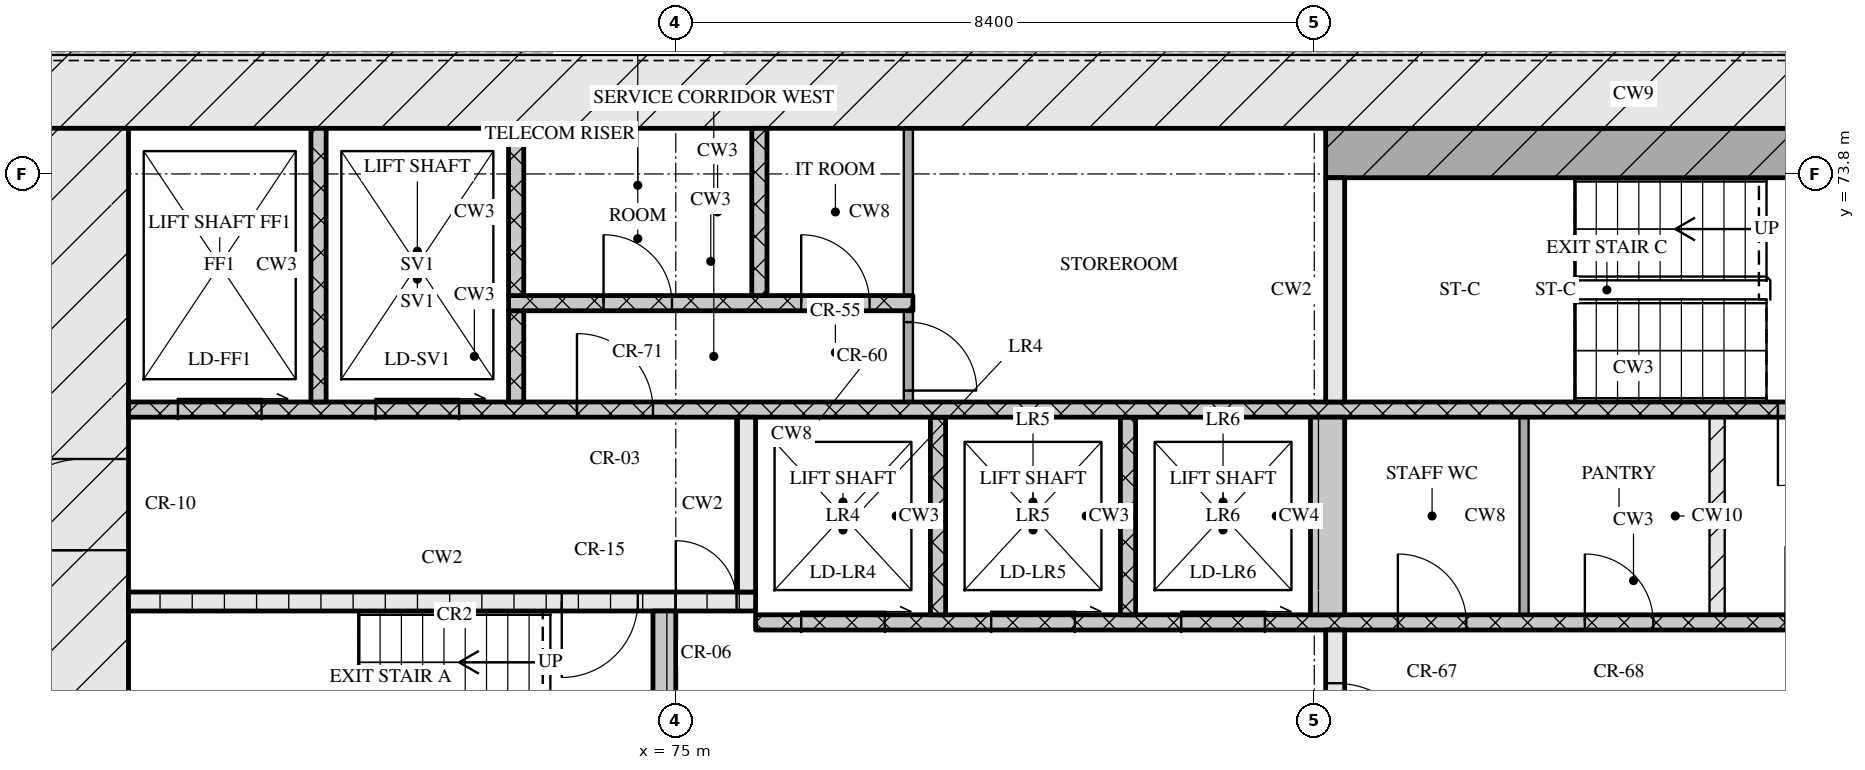
"""IFC4 building model, lengths in metres.
Left out: names, types, materials, properties, quantities, classifications, styles, units other than length and angle.
Written with IfcOpenShell. Run it as: python <this file> out.ifc"""

import sys

from ifc_helpers import new_model, si_unit, direction, frame, frame_2d, origin, place, context, subcontext, project, spatial, rectangle, extrude, element, fill, save


model = new_model("IFC4")
c1 = context("Model", 3, precision=1e-05, world=origin(), true_north=direction((0.0, 1.0)))
c2 = subcontext(c1, "Body", "Model", "MODEL_VIEW")
j1 = project(units=[si_unit("LENGTHUNIT", "METRE"), si_unit("PLANEANGLEUNIT", "RADIAN")], contexts=[c1])
p1 = place(None, origin())
s1 = spatial("IfcSite", under=j1, at=p1, CompositionType="ELEMENT")
p2 = place(p1, origin())
s2 = spatial("IfcBuilding", under=s1, at=p2, CompositionType="ELEMENT")
p3 = place(p2, frame((0.0, 0.0, 69.6)))
s3 = spatial("IfcBuildingStorey", under=s2, at=p3, CompositionType="ELEMENT", Elevation=69.6)
p4 = place(p3, frame((66.6, 75.0, 0.0), z_axis=(0.0, 0.0, 1.0), x_axis=(1.0, 0.0, 0.0)))
e1 = element("IfcWall", 1, at=p4, inside=s3, PredefinedType="SOLIDWALL", context=c2, shape_type="SweptSolid", body=[
    extrude(rectangle(XDim=42.0, YDim=1.2, at=frame_2d((21.0, 0.0))), origin(), (0.0, 0.0, 1.0), 3.32),
])
p5 = place(p3, frame((67.2, 62.4, 0.0), z_axis=(0.0, 0.0, 1.0), x_axis=(0.0, 1.0, 0.0)))
e2 = element("IfcWall", 2, at=p5, inside=s3, PredefinedType="SOLIDWALL", context=c2, shape_type="SweptSolid", body=[
    extrude(rectangle(XDim=12.0, YDim=1.2, at=frame_2d((6.0, 0.0))), origin(), (0.0, 0.0, 1.0), 3.32),
])
p6 = place(p5, frame((6.45, 0.0, 0.0)))
e3 = element("IfcOpeningElement", 3, at=p6, cuts=e2, PredefinedType="OPENING", context=c2, shape_type="SweptSolid", body=[
    extrude(rectangle(XDim=1.2, YDim=2.1, at=frame_2d((0.6, 1.05))), frame((0.0, 0.61, 0.0), z_axis=(0.0, -1.0, 0.0), x_axis=(1.0, 0.0, 0.0)), (0.0, 0.0, 1.0), 1.22),
])
p7 = place(p3, frame((74.85, 65.2, 0.0), z_axis=(0.0, 0.0, 1.0), x_axis=(0.0, 1.0, 0.0)))
e4 = element("IfcWall", 4, at=p7, inside=s3, PredefinedType="SOLIDWALL", context=c2, shape_type="SweptSolid", body=[
    extrude(rectangle(XDim=2.85, YDim=0.3, at=frame_2d((1.425, 0.0))), origin(), (0.0, 0.0, 1.0), 3.32),
])
p8 = place(p3, frame((83.675, 65.2, 0.0), z_axis=(0.0, 0.0, 1.0), x_axis=(0.0, 1.0, 0.0)))
e5 = element("IfcWall", 5, at=p8, inside=s3, PredefinedType="SOLIDWALL", context=c2, shape_type="SweptSolid", body=[
    extrude(rectangle(XDim=2.6, YDim=0.25, at=frame_2d((1.3, 0.0))), origin(), (0.0, 0.0, 1.0), 3.32),
])
p9 = place(p8, frame((0.7, 0.0, 0.0)))
e6 = element("IfcOpeningElement", 6, at=p9, cuts=e5, PredefinedType="OPENING", context=c2, shape_type="SweptSolid", body=[
    extrude(rectangle(XDim=1.2, YDim=2.1, at=frame_2d((0.6, 1.05))), frame((0.0, 0.135, 0.0), z_axis=(0.0, -1.0, 0.0), x_axis=(1.0, 0.0, 0.0)), (0.0, 0.0, 1.0), 0.27),
])
p10 = place(p3, frame((76.05, 67.9, 0.0), z_axis=(0.0, 0.0, 1.0), x_axis=(1.0, 0.0, 0.0)))
e7 = element("IfcWall", 7, at=p10, inside=s3, PredefinedType="SOLIDWALL", context=c2, shape_type="SweptSolid", body=[
    extrude(rectangle(XDim=23.1, YDim=0.2, at=frame_2d((11.55, 0.0))), origin(), (0.0, 0.0, 1.0), 3.32),
])
p11 = place(p10, frame((0.6, 0.0, 0.0)))
e8 = element("IfcOpeningElement", 8, at=p11, cuts=e7, PredefinedType="OPENING", context=c2, shape_type="SweptSolid", body=[
    extrude(rectangle(XDim=1.1, YDim=2.1, at=frame_2d((0.55, 1.05))), frame((0.0, 0.11, 0.0), z_axis=(0.0, -1.0, 0.0), x_axis=(1.0, 0.0, 0.0)), (0.0, 0.0, 1.0), 0.22),
])
p12 = place(p10, frame((3.1, 0.0, 0.0)))
e9 = element("IfcOpeningElement", 9, at=p12, cuts=e7, PredefinedType="OPENING", context=c2, shape_type="SweptSolid", body=[
    extrude(rectangle(XDim=1.1, YDim=2.1, at=frame_2d((0.55, 1.05))), frame((0.0, 0.11, 0.0), z_axis=(0.0, -1.0, 0.0), x_axis=(1.0, 0.0, 0.0)), (0.0, 0.0, 1.0), 0.22),
])
p13 = place(p10, frame((5.6, 0.0, 0.0)))
e10 = element("IfcOpeningElement", 10, at=p13, cuts=e7, PredefinedType="OPENING", context=c2, shape_type="SweptSolid", body=[
    extrude(rectangle(XDim=1.1, YDim=2.1, at=frame_2d((0.55, 1.05))), frame((0.0, 0.11, 0.0), z_axis=(0.0, -1.0, 0.0), x_axis=(1.0, 0.0, 0.0)), (0.0, 0.0, 1.0), 0.22),
])
p14 = place(p10, frame((8.45, 0.0, 0.0)))
e11 = element("IfcOpeningElement", 11, at=p14, cuts=e7, PredefinedType="OPENING", context=c2, shape_type="SweptSolid", body=[
    extrude(rectangle(XDim=0.9, YDim=2.1, at=frame_2d((0.45, 1.05))), frame((0.0, 0.11, 0.0), z_axis=(0.0, -1.0, 0.0), x_axis=(1.0, 0.0, 0.0)), (0.0, 0.0, 1.0), 0.22),
])
p15 = place(p10, frame((10.91, 0.0, 0.0)))
e12 = element("IfcOpeningElement", 12, at=p15, cuts=e7, PredefinedType="OPENING", context=c2, shape_type="SweptSolid", body=[
    extrude(rectangle(XDim=0.9, YDim=2.1, at=frame_2d((0.45, 1.05))), frame((0.0, 0.11, 0.0), z_axis=(0.0, -1.0, 0.0), x_axis=(1.0, 0.0, 0.0)), (0.0, 0.0, 1.0), 0.22),
])
p16 = place(p10, frame((13.55, 0.0, 0.0)))
e13 = element("IfcOpeningElement", 13, at=p16, cuts=e7, PredefinedType="OPENING", context=c2, shape_type="SweptSolid", body=[
    extrude(rectangle(XDim=1.0, YDim=2.1, at=frame_2d((0.5, 1.05))), frame((0.0, 0.11, 0.0), z_axis=(0.0, -1.0, 0.0), x_axis=(1.0, 0.0, 0.0)), (0.0, 0.0, 1.0), 0.22),
])
for number, where, z_axis, x_axis in (
    (14, (78.45, 68.0, 0.0), (0.0, 0.0, 1.0), (0.0, 1.0, 0.0)),
    (15, (80.95, 68.0, 0.0), (0.0, 0.0, 1.0), (0.0, 1.0, 0.0)),
):
    element("IfcWall", number, at=place(p3, frame(where, z_axis=z_axis, x_axis=x_axis)), inside=s3, PredefinedType="SOLIDWALL", context=c2, shape_type="SweptSolid", body=[
        extrude(rectangle(XDim=2.6, YDim=0.2, at=frame_2d((1.3, 0.0))), origin(), (0.0, 0.0, 1.0), 3.32),
    ])
p17 = place(p3, frame((83.575, 68.0, 0.0), z_axis=(0.0, 0.0, 1.0), x_axis=(0.0, 1.0, 0.0)))
e16 = element("IfcWall", 16, at=p17, inside=s3, PredefinedType="SOLIDWALL", context=c2, shape_type="SweptSolid", body=[
    extrude(rectangle(XDim=2.6, YDim=0.45, at=frame_2d((1.3, 0.0))), origin(), (0.0, 0.0, 1.0), 3.32),
])
p18 = place(p3, frame((86.16, 68.0, 0.0), z_axis=(0.0, 0.0, 1.0), x_axis=(0.0, 1.0, 0.0)))
e17 = element("IfcWall", 17, at=p18, inside=s3, PredefinedType="PARTITIONING", context=c2, shape_type="SweptSolid", body=[
    extrude(rectangle(XDim=2.6, YDim=0.12, at=frame_2d((1.3, 0.0))), origin(), (0.0, 0.0, 1.0), 3.32),
])
p19 = place(p3, frame((88.7, 68.0, 0.0), z_axis=(0.0, 0.0, 1.0), x_axis=(0.0, 1.0, 0.0)))
e18 = element("IfcWall", 18, at=p19, inside=s3, PredefinedType="PARTITIONING", context=c2, shape_type="SweptSolid", body=[
    extrude(rectangle(XDim=2.6, YDim=0.2, at=frame_2d((1.3, 0.0))), origin(), (0.0, 0.0, 1.0), 3.32),
])
p20 = place(p3, frame((67.8, 68.175, 0.0), z_axis=(0.0, 0.0, 1.0), x_axis=(1.0, 0.0, 0.0)))
e19 = element("IfcWall", 19, at=p20, inside=s3, PredefinedType="SOLIDWALL", context=c2, shape_type="SweptSolid", body=[
    extrude(rectangle(XDim=8.25, YDim=0.25, at=frame_2d((4.125, 0.0))), origin(), (0.0, 0.0, 1.0), 3.32),
])
p21 = place(p20, frame((5.7, 0.0, 0.0)))
e20 = element("IfcOpeningElement", 20, at=p21, cuts=e19, PredefinedType="OPENING", context=c2, shape_type="SweptSolid", body=[
    extrude(rectangle(XDim=1.0, YDim=2.1, at=frame_2d((0.5, 1.05))), frame((0.0, 0.135, 0.0), z_axis=(0.0, -1.0, 0.0), x_axis=(1.0, 0.0, 0.0)), (0.0, 0.0, 1.0), 0.27),
])
p22 = place(p20, frame((7.2, 0.0, 0.0)))
e21 = element("IfcOpeningElement", 21, at=p22, cuts=e19, PredefinedType="OPENING", context=c2, shape_type="SweptSolid", body=[
    extrude(rectangle(XDim=0.8, YDim=2.1, at=frame_2d((0.4, 1.05))), frame((0.0, 0.135, 0.0), z_axis=(0.0, -1.0, 0.0), x_axis=(1.0, 0.0, 0.0)), (0.0, 0.0, 1.0), 0.27),
])
p23 = place(p3, frame((75.925, 68.3, 0.0), z_axis=(0.0, 0.0, 1.0), x_axis=(0.0, 1.0, 0.0)))
e22 = element("IfcWall", 22, at=p23, inside=s3, PredefinedType="SOLIDWALL", context=c2, shape_type="SweptSolid", body=[
    extrude(rectangle(XDim=2.3, YDim=0.25, at=frame_2d((1.15, 0.0))), origin(), (0.0, 0.0, 1.0), 3.32),
])
p24 = place(p3, frame((67.8, 70.7, 0.0), z_axis=(0.0, 0.0, 1.0), x_axis=(1.0, 0.0, 0.0)))
e23 = element("IfcWall", 23, at=p24, inside=s3, PredefinedType="SOLIDWALL", context=c2, shape_type="SweptSolid", body=[
    extrude(rectangle(XDim=39.6, YDim=0.2, at=frame_2d((19.8, 0.0))), origin(), (0.0, 0.0, 1.0), 3.32),
])
p25 = place(p24, frame((0.65, 0.0, 0.0)))
e24 = element("IfcOpeningElement", 24, at=p25, cuts=e23, PredefinedType="OPENING", context=c2, shape_type="SweptSolid", body=[
    extrude(rectangle(XDim=1.1, YDim=2.1, at=frame_2d((0.55, 1.05))), frame((0.0, 0.11, 0.0), z_axis=(0.0, -1.0, 0.0), x_axis=(1.0, 0.0, 0.0)), (0.0, 0.0, 1.0), 0.22),
])
p26 = place(p24, frame((3.25, 0.0, 0.0)))
e25 = element("IfcOpeningElement", 25, at=p26, cuts=e23, PredefinedType="OPENING", context=c2, shape_type="SweptSolid", body=[
    extrude(rectangle(XDim=1.1, YDim=2.1, at=frame_2d((0.55, 1.05))), frame((0.0, 0.11, 0.0), z_axis=(0.0, -1.0, 0.0), x_axis=(1.0, 0.0, 0.0)), (0.0, 0.0, 1.0), 0.22),
])
p27 = place(p24, frame((5.9, 0.0, 0.0)))
e26 = element("IfcOpeningElement", 26, at=p27, cuts=e23, PredefinedType="OPENING", context=c2, shape_type="SweptSolid", body=[
    extrude(rectangle(XDim=1.0, YDim=2.1, at=frame_2d((0.5, 1.05))), frame((0.0, 0.11, 0.0), z_axis=(0.0, -1.0, 0.0), x_axis=(1.0, 0.0, 0.0)), (0.0, 0.0, 1.0), 0.22),
])
p28 = place(p24, frame((21.7, 0.0, 0.0)))
e27 = element("IfcOpeningElement", 27, at=p28, cuts=e23, PredefinedType="OPENING", context=c2, shape_type="SweptSolid", body=[
    extrude(rectangle(XDim=1.0, YDim=2.1, at=frame_2d((0.5, 1.05))), frame((0.0, 0.11, 0.0), z_axis=(0.0, -1.0, 0.0), x_axis=(1.0, 0.0, 0.0)), (0.0, 0.0, 1.0), 0.22),
])
p29 = place(p24, frame((32.7, 0.0, 0.0)))
e28 = element("IfcOpeningElement", 28, at=p29, cuts=e23, PredefinedType="OPENING", context=c2, shape_type="SweptSolid", body=[
    extrude(rectangle(XDim=1.0, YDim=2.1, at=frame_2d((0.5, 1.05))), frame((0.0, 0.11, 0.0), z_axis=(0.0, -1.0, 0.0), x_axis=(1.0, 0.0, 0.0)), (0.0, 0.0, 1.0), 0.22),
])
p30 = place(p24, frame((35.25, 0.0, 0.0)))
e29 = element("IfcOpeningElement", 29, at=p30, cuts=e23, PredefinedType="OPENING", context=c2, shape_type="SweptSolid", body=[
    extrude(rectangle(XDim=1.1, YDim=2.1, at=frame_2d((0.55, 1.05))), frame((0.0, 0.11, 0.0), z_axis=(0.0, -1.0, 0.0), x_axis=(1.0, 0.0, 0.0)), (0.0, 0.0, 1.0), 0.22),
])
p31 = place(p24, frame((37.85, 0.0, 0.0)))
e30 = element("IfcOpeningElement", 30, at=p31, cuts=e23, PredefinedType="OPENING", context=c2, shape_type="SweptSolid", body=[
    extrude(rectangle(XDim=1.1, YDim=2.1, at=frame_2d((0.55, 1.05))), frame((0.0, 0.11, 0.0), z_axis=(0.0, -1.0, 0.0), x_axis=(1.0, 0.0, 0.0)), (0.0, 0.0, 1.0), 0.22),
])
p32 = place(p3, frame((70.3, 70.8, 0.0), z_axis=(0.0, 0.0, 1.0), x_axis=(0.0, 1.0, 0.0)))
e31 = element("IfcWall", 31, at=p32, inside=s3, PredefinedType="SOLIDWALL", context=c2, shape_type="SweptSolid", body=[
    extrude(rectangle(XDim=3.6, YDim=0.2, at=frame_2d((1.8, 0.0))), origin(), (0.0, 0.0, 1.0), 3.32),
])
p33 = place(p3, frame((72.9, 70.8, 0.0), z_axis=(0.0, 0.0, 1.0), x_axis=(0.0, 1.0, 0.0)))
e32 = element("IfcWall", 32, at=p33, inside=s3, PredefinedType="SOLIDWALL", context=c2, shape_type="SweptSolid", body=[
    extrude(rectangle(XDim=1.2, YDim=0.2, at=frame_2d((0.6, 0.0))), origin(), (0.0, 0.0, 1.0), 3.32),
])
p34 = place(p3, frame((78.06, 70.8, 0.0), z_axis=(0.0, 0.0, 1.0), x_axis=(0.0, 1.0, 0.0)))
e33 = element("IfcWall", 33, at=p34, inside=s3, PredefinedType="PARTITIONING", context=c2, shape_type="SweptSolid", body=[
    extrude(rectangle(XDim=1.2, YDim=0.12, at=frame_2d((0.6, 0.0))), origin(), (0.0, 0.0, 1.0), 3.32),
])
p35 = place(p34, frame((0.15, 0.0, 0.0)))
e34 = element("IfcOpeningElement", 34, at=p35, cuts=e33, PredefinedType="OPENING", context=c2, shape_type="SweptSolid", body=[
    extrude(rectangle(XDim=0.9, YDim=2.1, at=frame_2d((0.45, 1.05))), frame((0.0, 0.07, 0.0), z_axis=(0.0, -1.0, 0.0), x_axis=(1.0, 0.0, 0.0)), (0.0, 0.0, 1.0), 0.14),
])
p36 = place(p3, frame((83.675, 70.8, 0.0), z_axis=(0.0, 0.0, 1.0), x_axis=(0.0, 1.0, 0.0)))
e35 = element("IfcWall", 35, at=p36, inside=s3, PredefinedType="SOLIDWALL", context=c2, shape_type="SweptSolid", body=[
    extrude(rectangle(XDim=2.95, YDim=0.25, at=frame_2d((1.475, 0.0))), origin(), (0.0, 0.0, 1.0), 3.32),
])
p37 = place(p3, frame((72.8, 72.1, 0.0), z_axis=(0.0, 0.0, 1.0), x_axis=(1.0, 0.0, 0.0)))
e36 = element("IfcWall", 36, at=p37, inside=s3, PredefinedType="SOLIDWALL", context=c2, shape_type="SweptSolid", body=[
    extrude(rectangle(XDim=5.32, YDim=0.2, at=frame_2d((2.66, 0.0))), origin(), (0.0, 0.0, 1.0), 3.32),
])
p38 = place(p37, frame((1.25, 0.0, 0.0)))
e37 = element("IfcOpeningElement", 37, at=p38, cuts=e36, PredefinedType="OPENING", context=c2, shape_type="SweptSolid", body=[
    extrude(rectangle(XDim=0.9, YDim=2.1, at=frame_2d((0.45, 1.05))), frame((0.0, 0.11, 0.0), z_axis=(0.0, -1.0, 0.0), x_axis=(1.0, 0.0, 0.0)), (0.0, 0.0, 1.0), 0.22),
])
p39 = place(p37, frame((3.85, 0.0, 0.0)))
e38 = element("IfcOpeningElement", 38, at=p39, cuts=e36, PredefinedType="OPENING", context=c2, shape_type="SweptSolid", body=[
    extrude(rectangle(XDim=0.9, YDim=2.1, at=frame_2d((0.45, 1.05))), frame((0.0, 0.11, 0.0), z_axis=(0.0, -1.0, 0.0), x_axis=(1.0, 0.0, 0.0)), (0.0, 0.0, 1.0), 0.22),
])
for number, where, z_axis, x_axis in (
    (39, (72.9, 72.2, 0.0), (0.0, 0.0, 1.0), (0.0, 1.0, 0.0)),
    (40, (76.1, 72.2, 0.0), (0.0, 0.0, 1.0), (0.0, 1.0, 0.0)),
):
    element("IfcWall", number, at=place(p3, frame(where, z_axis=z_axis, x_axis=x_axis)), inside=s3, PredefinedType="SOLIDWALL", context=c2, shape_type="SweptSolid", body=[
        extrude(rectangle(XDim=2.2, YDim=0.2, at=frame_2d((1.1, 0.0))), origin(), (0.0, 0.0, 1.0), 3.32),
    ])
p40 = place(p3, frame((78.06, 72.2, 0.0), z_axis=(0.0, 0.0, 1.0), x_axis=(0.0, 1.0, 0.0)))
e41 = element("IfcWall", 41, at=p40, inside=s3, PredefinedType="PARTITIONING", context=c2, shape_type="SweptSolid", body=[
    extrude(rectangle(XDim=2.2, YDim=0.12, at=frame_2d((1.1, 0.0))), origin(), (0.0, 0.0, 1.0), 3.32),
])
p41 = place(p3, frame((83.55, 74.075, 0.0), z_axis=(0.0, 0.0, 1.0), x_axis=(1.0, 0.0, 0.0)))
e42 = element("IfcWall", 42, at=p41, inside=s3, PredefinedType="SOLIDWALL", context=c2, shape_type="SweptSolid", body=[
    extrude(rectangle(XDim=8.1, YDim=0.65, at=frame_2d((4.05, 0.0))), origin(), (0.0, 0.0, 1.0), 3.32),
])
p42 = place(p9, origin())
e43 = element("IfcDoor", 43, at=p42, inside=s3, OperationType="SINGLE_SWING_RIGHT", PredefinedType="DOOR", context=c2, shape_type="SweptSolid", body=[
    extrude(rectangle(XDim=1.2, YDim=2.1, at=frame_2d((0.6, 1.05))), frame((0.0, 0.025, 0.0), z_axis=(0.0, -1.0, 0.0), x_axis=(1.0, 0.0, 0.0)), (0.0, 0.0, 1.0), 0.05),
])
fill(e6, e43)
p43 = place(p11, origin())
e44 = element("IfcDoor", 44, at=p43, inside=s3, OperationType="SLIDING_TO_RIGHT", PredefinedType="DOOR", context=c2, shape_type="SweptSolid", body=[
    extrude(rectangle(XDim=1.1, YDim=2.1, at=frame_2d((0.55, 1.05))), frame((0.0, 0.025, 0.0), z_axis=(0.0, -1.0, 0.0), x_axis=(1.0, 0.0, 0.0)), (0.0, 0.0, 1.0), 0.05),
])
fill(e8, e44)
p44 = place(p12, origin())
e45 = element("IfcDoor", 45, at=p44, inside=s3, OperationType="SLIDING_TO_RIGHT", PredefinedType="DOOR", context=c2, shape_type="SweptSolid", body=[
    extrude(rectangle(XDim=1.1, YDim=2.1, at=frame_2d((0.55, 1.05))), frame((0.0, 0.025, 0.0), z_axis=(0.0, -1.0, 0.0), x_axis=(1.0, 0.0, 0.0)), (0.0, 0.0, 1.0), 0.05),
])
fill(e9, e45)
p45 = place(p13, origin())
e46 = element("IfcDoor", 46, at=p45, inside=s3, OperationType="SLIDING_TO_RIGHT", PredefinedType="DOOR", context=c2, shape_type="SweptSolid", body=[
    extrude(rectangle(XDim=1.1, YDim=2.1, at=frame_2d((0.55, 1.05))), frame((0.0, 0.025, 0.0), z_axis=(0.0, -1.0, 0.0), x_axis=(1.0, 0.0, 0.0)), (0.0, 0.0, 1.0), 0.05),
])
fill(e10, e46)
p46 = place(p14, origin())
e47 = element("IfcDoor", 47, at=p46, inside=s3, OperationType="SINGLE_SWING_LEFT", PredefinedType="DOOR", context=c2, shape_type="SweptSolid", body=[
    extrude(rectangle(XDim=0.9, YDim=2.1, at=frame_2d((0.45, 1.05))), frame((0.0, 0.025, 0.0), z_axis=(0.0, -1.0, 0.0), x_axis=(1.0, 0.0, 0.0)), (0.0, 0.0, 1.0), 0.05),
])
fill(e11, e47)
p47 = place(p15, origin())
e48 = element("IfcDoor", 48, at=p47, inside=s3, OperationType="SINGLE_SWING_LEFT", PredefinedType="DOOR", context=c2, shape_type="SweptSolid", body=[
    extrude(rectangle(XDim=0.9, YDim=2.1, at=frame_2d((0.45, 1.05))), frame((0.0, 0.025, 0.0), z_axis=(0.0, -1.0, 0.0), x_axis=(1.0, 0.0, 0.0)), (0.0, 0.0, 1.0), 0.05),
])
fill(e12, e48)
p48 = place(p21, origin())
e49 = element("IfcDoor", 49, at=p48, inside=s3, OperationType="SINGLE_SWING_RIGHT", PredefinedType="DOOR", context=c2, shape_type="SweptSolid", body=[
    extrude(rectangle(XDim=1.0, YDim=2.1, at=frame_2d((0.5, 1.05))), frame((0.0, 0.025, 0.0), z_axis=(0.0, -1.0, 0.0), x_axis=(1.0, 0.0, 0.0)), (0.0, 0.0, 1.0), 0.05),
])
fill(e20, e49)
p49 = place(p22, origin())
e50 = element("IfcDoor", 50, at=p49, inside=s3, OperationType="SINGLE_SWING_LEFT", PredefinedType="DOOR", context=c2, shape_type="SweptSolid", body=[
    extrude(rectangle(XDim=0.8, YDim=2.1, at=frame_2d((0.4, 1.05))), frame((0.0, 0.025, 0.0), z_axis=(0.0, -1.0, 0.0), x_axis=(1.0, 0.0, 0.0)), (0.0, 0.0, 1.0), 0.05),
])
fill(e21, e50)
p50 = place(p6, origin())
e51 = element("IfcDoor", 51, at=p50, inside=s3, OperationType="SINGLE_SWING_LEFT", PredefinedType="DOOR", context=c2, shape_type="SweptSolid", body=[
    extrude(rectangle(XDim=1.2, YDim=2.1, at=frame_2d((0.6, 1.05))), frame((0.0, 0.025, 0.0), z_axis=(0.0, -1.0, 0.0), x_axis=(1.0, 0.0, 0.0)), (0.0, 0.0, 1.0), 0.05),
])
fill(e3, e51)
p51 = place(p25, origin())
e52 = element("IfcDoor", 52, at=p51, inside=s3, OperationType="SLIDING_TO_RIGHT", PredefinedType="DOOR", context=c2, shape_type="SweptSolid", body=[
    extrude(rectangle(XDim=1.1, YDim=2.1, at=frame_2d((0.55, 1.05))), frame((0.0, 0.025, 0.0), z_axis=(0.0, -1.0, 0.0), x_axis=(1.0, 0.0, 0.0)), (0.0, 0.0, 1.0), 0.05),
])
fill(e24, e52)
p52 = place(p26, origin())
e53 = element("IfcDoor", 53, at=p52, inside=s3, OperationType="SLIDING_TO_RIGHT", PredefinedType="DOOR", context=c2, shape_type="SweptSolid", body=[
    extrude(rectangle(XDim=1.1, YDim=2.1, at=frame_2d((0.55, 1.05))), frame((0.0, 0.025, 0.0), z_axis=(0.0, -1.0, 0.0), x_axis=(1.0, 0.0, 0.0)), (0.0, 0.0, 1.0), 0.05),
])
fill(e25, e53)
p53 = place(p27, origin())
e54 = element("IfcDoor", 54, at=p53, inside=s3, OperationType="SINGLE_SWING_LEFT", PredefinedType="DOOR", context=c2, shape_type="SweptSolid", body=[
    extrude(rectangle(XDim=1.0, YDim=2.1, at=frame_2d((0.5, 1.05))), frame((0.0, 0.025, 0.0), z_axis=(0.0, -1.0, 0.0), x_axis=(1.0, 0.0, 0.0)), (0.0, 0.0, 1.0), 0.05),
])
fill(e26, e54)
p54 = place(p28, origin())
e55 = element("IfcDoor", 55, at=p54, inside=s3, OperationType="SINGLE_SWING_RIGHT", PredefinedType="DOOR", context=c2, shape_type="SweptSolid", body=[
    extrude(rectangle(XDim=1.0, YDim=2.1, at=frame_2d((0.5, 1.05))), frame((0.0, 0.025, 0.0), z_axis=(0.0, -1.0, 0.0), x_axis=(1.0, 0.0, 0.0)), (0.0, 0.0, 1.0), 0.05),
])
fill(e27, e55)
p55 = place(p35, origin())
e56 = element("IfcDoor", 56, at=p55, inside=s3, OperationType="SINGLE_SWING_RIGHT", PredefinedType="DOOR", context=c2, shape_type="SweptSolid", body=[
    extrude(rectangle(XDim=0.9, YDim=2.1, at=frame_2d((0.45, 1.05))), frame((0.0, 0.025, 0.0), z_axis=(0.0, -1.0, 0.0), x_axis=(1.0, 0.0, 0.0)), (0.0, 0.0, 1.0), 0.05),
])
fill(e34, e56)
p56 = place(p38, origin())
e57 = element("IfcDoor", 57, at=p56, inside=s3, OperationType="SINGLE_SWING_LEFT", PredefinedType="DOOR", context=c2, shape_type="SweptSolid", body=[
    extrude(rectangle(XDim=0.9, YDim=2.1, at=frame_2d((0.45, 1.05))), frame((0.0, 0.025, 0.0), z_axis=(0.0, -1.0, 0.0), x_axis=(1.0, 0.0, 0.0)), (0.0, 0.0, 1.0), 0.05),
])
fill(e37, e57)
p57 = place(p39, origin())
e58 = element("IfcDoor", 58, at=p57, inside=s3, OperationType="SINGLE_SWING_LEFT", PredefinedType="DOOR", context=c2, shape_type="SweptSolid", body=[
    extrude(rectangle(XDim=0.9, YDim=2.1, at=frame_2d((0.45, 1.05))), frame((0.0, 0.025, 0.0), z_axis=(0.0, -1.0, 0.0), x_axis=(1.0, 0.0, 0.0)), (0.0, 0.0, 1.0), 0.05),
])
fill(e38, e58)
save(model, sys.argv[1])
